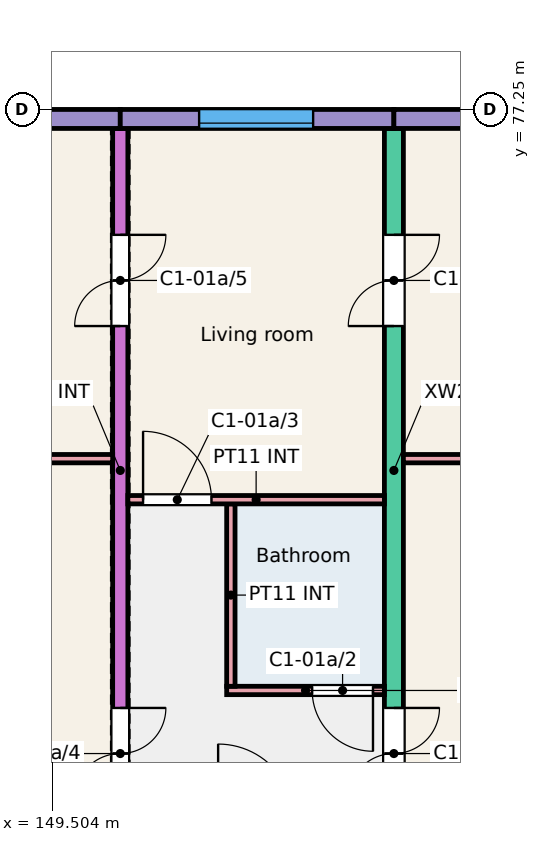
"""IFC4 building model, lengths in metres.
Left out: names, types, materials, properties, quantities, classifications, styles, units other than length and angle.
Written with IfcOpenShell. Run it as: python <this file> out.ifc"""

import sys

from ifc_helpers import new_model, si_unit, direction, frame, frame_2d, origin, place, context, subcontext, project, spatial, rectangle, extrude, element, fill, save


model = new_model("IFC4")
c1 = context("Model", 3, precision=1e-05, world=origin(), true_north=direction((0.0, 1.0)))
c2 = subcontext(c1, "Body", "Model", "MODEL_VIEW")
j1 = project(units=[si_unit("LENGTHUNIT", "METRE"), si_unit("PLANEANGLEUNIT", "RADIAN")], contexts=[c1])
p1 = place(None, origin())
s1 = spatial("IfcSite", under=j1, at=p1, CompositionType="ELEMENT")
p2 = place(p1, origin())
s2 = spatial("IfcBuilding", under=s1, at=p2, CompositionType="ELEMENT")
p3 = place(p2, frame((0.0, 0.0, 3.0)))
s3 = spatial("IfcBuildingStorey", under=s2, at=p3, CompositionType="ELEMENT", Elevation=3.0)
p4 = place(p3, frame((150.4, 68.0, 0.0), z_axis=(0.0, 0.0, 1.0), x_axis=(0.0, 1.0, 0.0)))
e1 = element("IfcWall", 1, at=p4, inside=s3, PredefinedType="SHEAR", context=c2, shape_type="SweptSolid", body=[
    extrude(rectangle(XDim=9.0, YDim=0.2, at=frame_2d((4.5, 0.0))), origin(), (0.0, 0.0, 1.0), 3.0),
])
p5 = place(p4, frame((0.175, 0.0, 0.0)))
e2 = element("IfcOpeningElement", 2, at=p5, cuts=e1, PredefinedType="OPENING", context=c2, shape_type="SweptSolid", body=[
    extrude(rectangle(XDim=1.2, YDim=2.1, at=frame_2d((0.6, 1.05))), frame((0.0, 0.11, 0.0), z_axis=(0.0, -1.0, 0.0), x_axis=(1.0, 0.0, 0.0)), (0.0, 0.0, 1.0), 0.22),
])
p6 = place(p4, frame((6.4, 0.0, 0.0)))
e3 = element("IfcOpeningElement", 3, at=p6, cuts=e1, PredefinedType="OPENING", context=c2, shape_type="SweptSolid", body=[
    extrude(rectangle(XDim=1.2, YDim=2.1, at=frame_2d((0.6, 1.05))), frame((0.0, 0.11, 0.0), z_axis=(0.0, -1.0, 0.0), x_axis=(1.0, 0.0, 0.0)), (0.0, 0.0, 1.0), 0.22),
])
p7 = place(p3, frame((154.0, 68.0, 0.0), z_axis=(0.0, 0.0, 1.0), x_axis=(0.0, 1.0, 0.0)))
e4 = element("IfcWall", 4, at=p7, inside=s3, PredefinedType="SHEAR", context=c2, shape_type="SweptSolid", body=[
    extrude(rectangle(XDim=9.0, YDim=0.25, at=frame_2d((4.5, 0.0))), origin(), (0.0, 0.0, 1.0), 3.0),
])
p8 = place(p7, frame((0.175, 0.0, 0.0)))
e5 = element("IfcOpeningElement", 5, at=p8, cuts=e4, PredefinedType="OPENING", context=c2, shape_type="SweptSolid", body=[
    extrude(rectangle(XDim=1.2, YDim=2.1, at=frame_2d((0.6, 1.05))), frame((0.0, 0.135, 0.0), z_axis=(0.0, -1.0, 0.0), x_axis=(1.0, 0.0, 0.0)), (0.0, 0.0, 1.0), 0.27),
])
p9 = place(p7, frame((6.4, 0.0, 0.0)))
e6 = element("IfcOpeningElement", 6, at=p9, cuts=e4, PredefinedType="OPENING", context=c2, shape_type="SweptSolid", body=[
    extrude(rectangle(XDim=1.2, YDim=2.1, at=frame_2d((0.6, 1.05))), frame((0.0, 0.135, 0.0), z_axis=(0.0, -1.0, 0.0), x_axis=(1.0, 0.0, 0.0)), (0.0, 0.0, 1.0), 0.27),
])
p10 = place(p3, frame((146.65, 77.125, 0.0), z_axis=(0.0, 0.0, 1.0), x_axis=(1.0, 0.0, 0.0)))
e7 = element("IfcWall", 7, at=p10, inside=s3, PredefinedType="SOLIDWALL", context=c2, shape_type="SweptSolid", body=[
    extrude(rectangle(XDim=3.75, YDim=0.25, at=frame_2d((1.875, 0.0))), origin(), (0.0, 0.0, 1.0), 3.0),
])
p11 = place(p10, frame((1.225, 0.0, 0.9)))
e8 = element("IfcOpeningElement", 8, at=p11, cuts=e7, PredefinedType="OPENING", context=c2, shape_type="SweptSolid", body=[
    extrude(rectangle(XDim=1.5, YDim=1.5, at=frame_2d((0.75, 0.75))), frame((0.0, 0.135, 0.0), z_axis=(0.0, -1.0, 0.0), x_axis=(1.0, 0.0, 0.0)), (0.0, 0.0, 1.0), 0.27),
])
p12 = place(p3, frame((150.4, 77.125, 0.0), z_axis=(0.0, 0.0, 1.0), x_axis=(1.0, 0.0, 0.0)))
e9 = element("IfcWall", 9, at=p12, inside=s3, PredefinedType="SOLIDWALL", context=c2, shape_type="SweptSolid", body=[
    extrude(rectangle(XDim=3.6, YDim=0.25, at=frame_2d((1.8, 0.0))), origin(), (0.0, 0.0, 1.0), 3.0),
])
p13 = place(p12, frame((1.038, 0.0, 0.9)))
e10 = element("IfcOpeningElement", 10, at=p13, cuts=e9, PredefinedType="OPENING", context=c2, shape_type="SweptSolid", body=[
    extrude(rectangle(XDim=1.5, YDim=1.5, at=frame_2d((0.75, 0.75))), frame((0.0, 0.135, 0.0), z_axis=(0.0, -1.0, 0.0), x_axis=(1.0, 0.0, 0.0)), (0.0, 0.0, 1.0), 0.27),
])
p14 = place(p3, frame((154.0, 77.125, 0.0), z_axis=(0.0, 0.0, 1.0), x_axis=(1.0, 0.0, 0.0)))
e11 = element("IfcWall", 11, at=p14, inside=s3, PredefinedType="SOLIDWALL", context=c2, shape_type="SweptSolid", body=[
    extrude(rectangle(XDim=3.6, YDim=0.25, at=frame_2d((1.8, 0.0))), origin(), (0.0, 0.0, 1.0), 3.0),
])
p15 = place(p14, frame((1.2, 0.0, 1.1)))
e12 = element("IfcOpeningElement", 12, at=p15, cuts=e11, PredefinedType="OPENING", context=c2, shape_type="SweptSolid", body=[
    extrude(rectangle(XDim=1.2, YDim=1.3, at=frame_2d((0.6, 0.65))), frame((0.0, 0.135, 0.0), z_axis=(0.0, -1.0, 0.0), x_axis=(1.0, 0.0, 0.0)), (0.0, 0.0, 1.0), 0.27),
])
p16 = place(p3, frame((151.8, 69.605, 0.0), z_axis=(0.0, 0.0, 1.0), x_axis=(1.0, 0.0, 0.0)))
e13 = element("IfcWall", 13, at=p16, inside=s3, PredefinedType="PARTITIONING", context=c2, shape_type="SweptSolid", body=[
    extrude(rectangle(XDim=2.075, YDim=0.11, at=frame_2d((1.038, 0.0))), origin(), (0.0, 0.0, 1.0), 2.8),
])
p17 = place(p16, frame((1.125, 0.0, 0.0)))
e14 = element("IfcOpeningElement", 14, at=p17, cuts=e13, PredefinedType="OPENING", context=c2, shape_type="SweptSolid", body=[
    extrude(rectangle(XDim=0.8, YDim=2.1, at=frame_2d((0.4, 1.05))), frame((0.0, 0.065, 0.0), z_axis=(0.0, -1.0, 0.0), x_axis=(1.0, 0.0, 0.0)), (0.0, 0.0, 1.0), 0.13),
])
p18 = place(p3, frame((151.855, 69.66, 0.0), z_axis=(0.0, 0.0, 1.0), x_axis=(0.0, 1.0, 0.0)))
e15 = element("IfcWall", 15, at=p18, inside=s3, PredefinedType="PARTITIONING", context=c2, shape_type="SweptSolid", body=[
    extrude(rectangle(XDim=2.4, YDim=0.11, at=frame_2d((1.2, 0.0))), origin(), (0.0, 0.0, 1.0), 2.8),
])
p19 = place(p3, frame((150.5, 72.115, 0.0), z_axis=(0.0, 0.0, 1.0), x_axis=(1.0, 0.0, 0.0)))
e16 = element("IfcWall", 16, at=p19, inside=s3, PredefinedType="PARTITIONING", context=c2, shape_type="SweptSolid", body=[
    extrude(rectangle(XDim=3.375, YDim=0.11, at=frame_2d((1.688, 0.0))), origin(), (0.0, 0.0, 1.0), 2.8),
])
p20 = place(p19, frame((0.2, 0.0, 0.0)))
e17 = element("IfcOpeningElement", 17, at=p20, cuts=e16, PredefinedType="OPENING", context=c2, shape_type="SweptSolid", body=[
    extrude(rectangle(XDim=0.9, YDim=2.1, at=frame_2d((0.45, 1.05))), frame((0.0, 0.065, 0.0), z_axis=(0.0, -1.0, 0.0), x_axis=(1.0, 0.0, 0.0)), (0.0, 0.0, 1.0), 0.13),
])
for number, where, z_axis, x_axis in (
    (18, (146.95, 72.655, 0.0), (0.0, 0.0, 1.0), (1.0, 0.0, 0.0)),
    (19, (154.125, 72.655, 0.0), (0.0, 0.0, 1.0), (1.0, 0.0, 0.0)),
):
    element("IfcWall", number, at=place(p3, frame(where, z_axis=z_axis, x_axis=x_axis)), inside=s3, PredefinedType="PARTITIONING", context=c2, shape_type="SweptSolid", body=[
        extrude(rectangle(XDim=3.35, YDim=0.11, at=frame_2d((1.675, 0.0))), origin(), (0.0, 0.0, 1.0), 2.8),
    ])
p21 = place(p13, origin())
e20 = element("IfcWindow", 20, at=p21, inside=s3, PartitioningType="SINGLE_PANEL", PredefinedType="WINDOW", context=c2, shape_type="SweptSolid", body=[
    extrude(rectangle(XDim=1.5, YDim=1.5, at=frame_2d((0.75, 0.75))), frame((0.0, -0.025, 0.0), z_axis=(0.0, -1.0, 0.0), x_axis=(1.0, 0.0, 0.0)), (0.0, 0.0, 1.0), 0.06),
])
fill(e10, e20)
p22 = place(p17, origin())
e21 = element("IfcDoor", 21, at=p22, inside=s3, OperationType="SINGLE_SWING_RIGHT", PredefinedType="DOOR", context=c2, shape_type="SweptSolid", body=[
    extrude(rectangle(XDim=0.8, YDim=2.1, at=frame_2d((0.4, 1.05))), frame((0.0, 0.025, 0.0), z_axis=(0.0, -1.0, 0.0), x_axis=(1.0, 0.0, 0.0)), (0.0, 0.0, 1.0), 0.05),
])
fill(e14, e21)
p23 = place(p20, origin())
e22 = element("IfcDoor", 22, at=p23, inside=s3, OperationType="SINGLE_SWING_LEFT", PredefinedType="DOOR", context=c2, shape_type="SweptSolid", body=[
    extrude(rectangle(XDim=0.9, YDim=2.1, at=frame_2d((0.45, 1.05))), frame((0.0, 0.025, 0.0), z_axis=(0.0, -1.0, 0.0), x_axis=(1.0, 0.0, 0.0)), (0.0, 0.0, 1.0), 0.05),
])
fill(e17, e22)
p24 = place(p5, origin())
e23 = element("IfcDoor", 23, at=p24, inside=s3, OperationType="DOUBLE_DOOR_SINGLE_SWING", PredefinedType="DOOR", context=c2, shape_type="SweptSolid", body=[
    extrude(rectangle(XDim=1.2, YDim=2.1, at=frame_2d((0.6, 1.05))), frame((0.0, 0.025, 0.0), z_axis=(0.0, -1.0, 0.0), x_axis=(1.0, 0.0, 0.0)), (0.0, 0.0, 1.0), 0.05),
])
fill(e2, e23)
p25 = place(p6, origin())
e24 = element("IfcDoor", 24, at=p25, inside=s3, OperationType="DOUBLE_DOOR_SINGLE_SWING", PredefinedType="DOOR", context=c2, shape_type="SweptSolid", body=[
    extrude(rectangle(XDim=1.2, YDim=2.1, at=frame_2d((0.6, 1.05))), frame((0.0, 0.025, 0.0), z_axis=(0.0, -1.0, 0.0), x_axis=(1.0, 0.0, 0.0)), (0.0, 0.0, 1.0), 0.05),
])
fill(e3, e24)
p26 = place(p8, origin())
e25 = element("IfcDoor", 25, at=p26, inside=s3, OperationType="DOUBLE_DOOR_SINGLE_SWING", PredefinedType="DOOR", context=c2, shape_type="SweptSolid", body=[
    extrude(rectangle(XDim=1.2, YDim=2.1, at=frame_2d((0.6, 1.05))), frame((0.0, 0.025, 0.0), z_axis=(0.0, -1.0, 0.0), x_axis=(1.0, 0.0, 0.0)), (0.0, 0.0, 1.0), 0.05),
])
fill(e5, e25)
p27 = place(p9, origin())
e26 = element("IfcDoor", 26, at=p27, inside=s3, OperationType="DOUBLE_DOOR_SINGLE_SWING", PredefinedType="DOOR", context=c2, shape_type="SweptSolid", body=[
    extrude(rectangle(XDim=1.2, YDim=2.1, at=frame_2d((0.6, 1.05))), frame((0.0, 0.025, 0.0), z_axis=(0.0, -1.0, 0.0), x_axis=(1.0, 0.0, 0.0)), (0.0, 0.0, 1.0), 0.05),
])
fill(e6, e26)
save(model, sys.argv[1])
